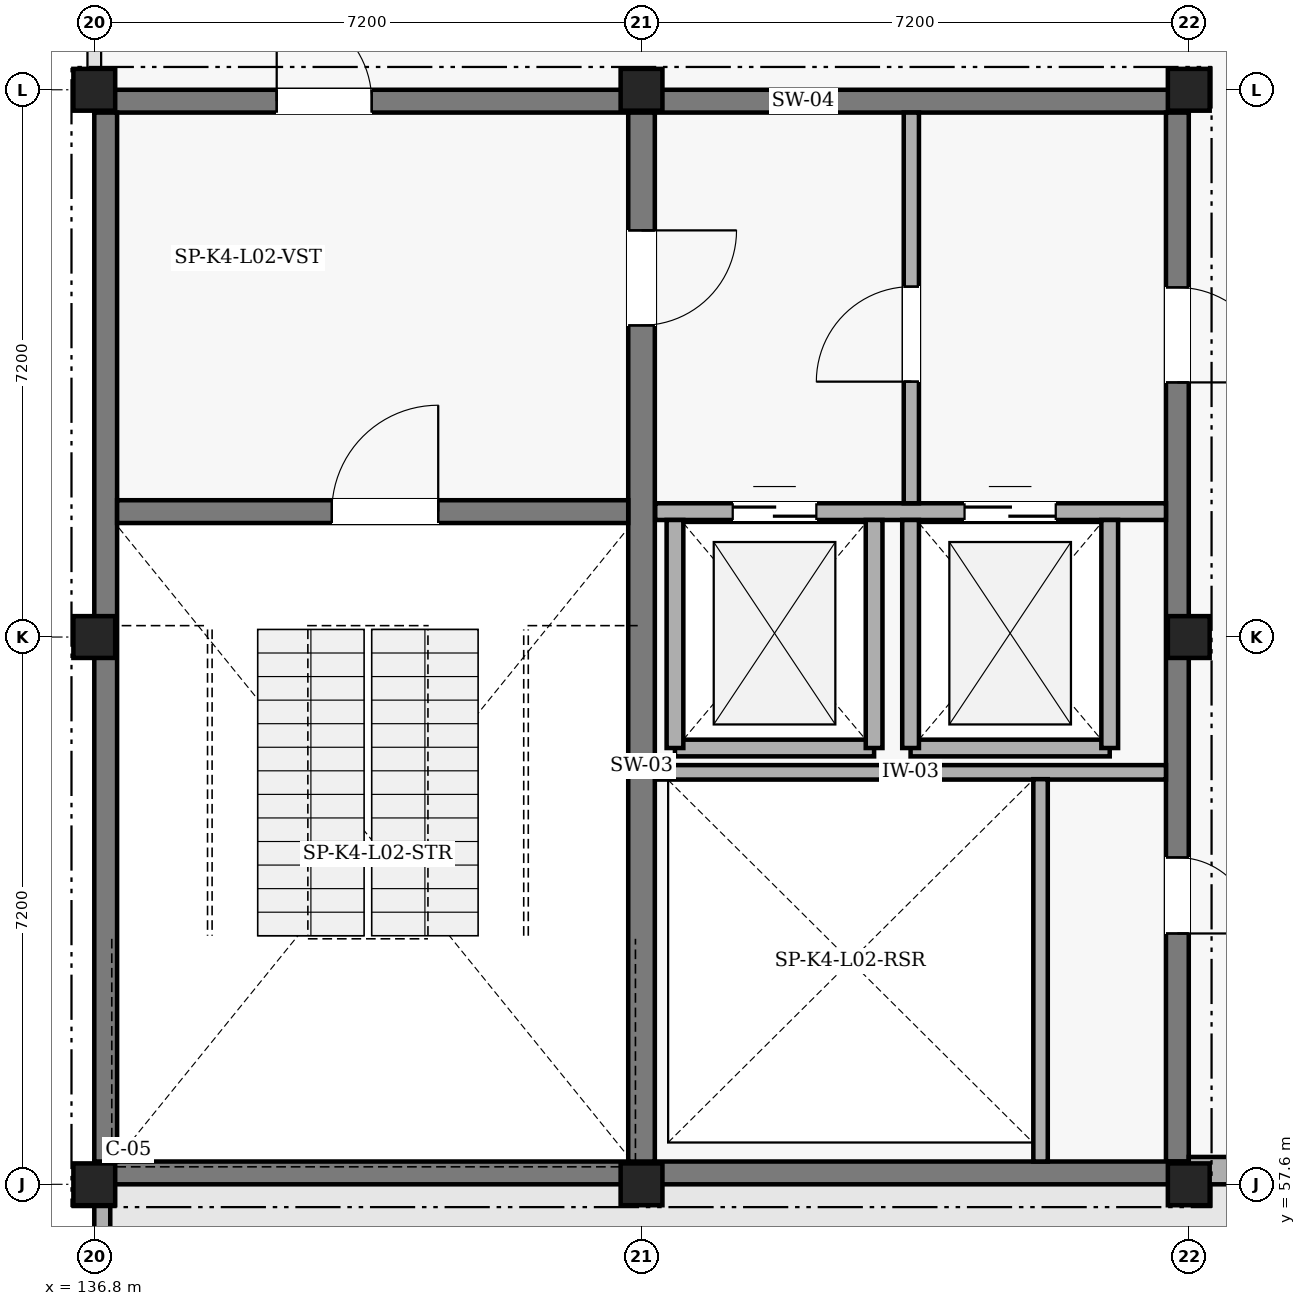
"""IFC4 building model, lengths in metres.
Left out: names, types, materials, properties, quantities, classifications, styles, units other than length and angle.
Written with IfcOpenShell. Run it as: python <this file> out.ifc"""

import sys

from ifc_helpers import new_model, si_unit, direction, frame, frame_2d, origin, origin_2d, place, context, subcontext, project, spatial, rectangle, extrude, element, fill, save


model = new_model("IFC4")
c1 = context("Model", 3, precision=1e-05, world=origin(), true_north=direction((0.0, 1.0)))
c2 = subcontext(c1, "Body", "Model", "MODEL_VIEW")
j1 = project(units=[si_unit("LENGTHUNIT", "METRE"), si_unit("PLANEANGLEUNIT", "RADIAN")], contexts=[c1])
p1 = place(None, origin())
s1 = spatial("IfcSite", under=j1, at=p1, CompositionType="ELEMENT")
p2 = place(p1, origin())
s2 = spatial("IfcBuilding", under=s1, at=p2, CompositionType="ELEMENT")
p3 = place(p2, frame((0.0, 0.0, 9.6)))
s3 = spatial("IfcBuildingStorey", under=s2, at=p3, CompositionType="ELEMENT", Elevation=9.6)
p4 = place(p3, frame((136.8, 71.85, 0.0), z_axis=(0.0, 0.0, 1.0), x_axis=(1.0, 0.0, 0.0)))
e1 = element("IfcWall", 1, at=p4, inside=s3, PredefinedType="SHEAR", context=c2, shape_type="SweptSolid", body=[
    extrude(rectangle(XDim=14.4, YDim=0.3, at=frame_2d((7.2, 0.0))), origin(), (0.0, 0.0, 1.0), 4.2),
])
p5 = place(p4, frame((2.4, 0.0, 0.0)))
e2 = element("IfcOpeningElement", 2, at=p5, cuts=e1, PredefinedType="OPENING", context=c2, shape_type="SweptSolid", body=[
    extrude(rectangle(XDim=1.25, YDim=2.2, at=frame_2d((0.625, 1.1))), frame((0.0, 0.16, 0.0), z_axis=(0.0, -1.0, 0.0), x_axis=(1.0, 0.0, 0.0)), (0.0, 0.0, 1.0), 0.32),
])
p6 = place(p3, frame((151.05, 71.7, 0.0), z_axis=(0.0, 0.0, 1.0), x_axis=(0.0, -1.0, 0.0)))
e3 = element("IfcWall", 3, at=p6, inside=s3, PredefinedType="SHEAR", context=c2, shape_type="SweptSolid", body=[
    extrude(rectangle(XDim=13.8, YDim=0.3, at=frame_2d((6.9, 0.0))), origin(), (0.0, 0.0, 1.0), 4.2),
])
p7 = place(p6, frame((9.8, 0.0, 0.0)))
e4 = element("IfcOpeningElement", 4, at=p7, cuts=e3, PredefinedType="OPENING", context=c2, shape_type="SweptSolid", body=[
    extrude(rectangle(XDim=1.0, YDim=2.15, at=frame_2d((0.5, 1.075))), frame((0.0, 0.16, 0.0), z_axis=(0.0, -1.0, 0.0), x_axis=(1.0, 0.0, 0.0)), (0.0, 0.0, 1.0), 0.32),
])
p8 = place(p6, frame((2.3, 0.0, 0.0)))
e5 = element("IfcOpeningElement", 5, at=p8, cuts=e3, PredefinedType="OPENING", context=c2, shape_type="SweptSolid", body=[
    extrude(rectangle(XDim=1.25, YDim=2.2, at=frame_2d((0.625, 1.1))), frame((0.0, 0.16, 0.0), z_axis=(0.0, -1.0, 0.0), x_axis=(1.0, 0.0, 0.0)), (0.0, 0.0, 1.0), 0.32),
])
p9 = place(p3, frame((151.2, 57.75, 0.0), z_axis=(0.0, 0.0, 1.0), x_axis=(-1.0, 0.0, 0.0)))
e6 = element("IfcWall", 6, at=p9, inside=s3, PredefinedType="SHEAR", context=c2, shape_type="SweptSolid", body=[
    extrude(rectangle(XDim=14.4, YDim=0.3, at=frame_2d((7.2, 0.0))), origin(), (0.0, 0.0, 1.0), 4.2),
])
p10 = place(p3, frame((136.95, 57.9, 0.0), z_axis=(0.0, 0.0, 1.0), x_axis=(0.0, 1.0, 0.0)))
e7 = element("IfcWall", 7, at=p10, inside=s3, PredefinedType="SHEAR", context=c2, shape_type="SweptSolid", body=[
    extrude(rectangle(XDim=13.8, YDim=0.3, at=frame_2d((6.9, 0.0))), origin(), (0.0, 0.0, 1.0), 4.2),
])
p11 = place(p3, frame((144.0, 71.7, 0.0), z_axis=(0.0, 0.0, 1.0), x_axis=(0.0, -1.0, 0.0)))
e8 = element("IfcWall", 8, at=p11, inside=s3, PredefinedType="SHEAR", context=c2, shape_type="SweptSolid", body=[
    extrude(rectangle(XDim=13.8, YDim=0.35, at=frame_2d((6.9, 0.0))), origin(), (0.0, 0.0, 1.0), 4.2),
])
p12 = place(p11, frame((1.55, 0.0, 0.0)))
e9 = element("IfcOpeningElement", 9, at=p12, cuts=e8, PredefinedType="OPENING", context=c2, shape_type="SweptSolid", body=[
    extrude(rectangle(XDim=1.25, YDim=2.2, at=frame_2d((0.625, 1.1))), frame((0.0, 0.185, 0.0), z_axis=(0.0, -1.0, 0.0), x_axis=(1.0, 0.0, 0.0)), (0.0, 0.0, 1.0), 0.37),
])
p13 = place(p3, frame((137.1, 66.45, 0.0), z_axis=(0.0, 0.0, 1.0), x_axis=(1.0, 0.0, 0.0)))
e10 = element("IfcWall", 10, at=p13, inside=s3, PredefinedType="SHEAR", context=c2, shape_type="SweptSolid", body=[
    extrude(rectangle(XDim=6.725, YDim=0.3, at=frame_2d((3.362, 0.0))), origin(), (0.0, 0.0, 1.0), 4.2),
])
p14 = place(p13, frame((2.825, 0.0, 0.0)))
e11 = element("IfcOpeningElement", 11, at=p14, cuts=e10, PredefinedType="OPENING", context=c2, shape_type="SweptSolid", body=[
    extrude(rectangle(XDim=1.4, YDim=2.2, at=frame_2d((0.7, 1.1))), frame((0.0, 0.16, 0.0), z_axis=(0.0, -1.0, 0.0), x_axis=(1.0, 0.0, 0.0)), (0.0, 0.0, 1.0), 0.32),
])
for number, where, z_axis, x_axis in (
    (12, (136.8, 57.6, 0.0), (0.0, 0.0, 1.0), (1.0, 0.0, 0.0)),
    (13, (136.8, 64.8, 0.0), (0.0, 0.0, 1.0), (1.0, 0.0, 0.0)),
    (14, (136.8, 72.0, 0.0), (0.0, 0.0, 1.0), (1.0, 0.0, 0.0)),
    (15, (144.0, 57.6, 0.0), (0.0, 0.0, 1.0), (1.0, 0.0, 0.0)),
    (16, (144.0, 72.0, 0.0), (0.0, 0.0, 1.0), (1.0, 0.0, 0.0)),
    (17, (151.2, 57.6, 0.0), (0.0, 0.0, 1.0), (1.0, 0.0, 0.0)),
    (18, (151.2, 64.8, 0.0), (0.0, 0.0, 1.0), (1.0, 0.0, 0.0)),
    (19, (151.2, 72.0, 0.0), (0.0, 0.0, 1.0), (1.0, 0.0, 0.0)),
):
    element("IfcColumn", number, at=place(p3, frame(where, z_axis=z_axis, x_axis=x_axis)), inside=s3, PredefinedType="COLUMN", context=c2, shape_type="SweptSolid", body=[
        extrude(rectangle(XDim=0.55, YDim=0.55, at=origin_2d()), origin(), (0.0, 0.0, 1.0), 3.92),
    ])
p15 = place(p3, frame((158.4, 57.78, 0.0), z_axis=(0.0, 0.0, 1.0), x_axis=(-1.0, 0.0, 0.0)))
e20 = element("IfcWall", 20, at=p15, inside=s3, PredefinedType="SOLIDWALL", context=c2, shape_type="SweptSolid", body=[
    extrude(rectangle(XDim=7.2, YDim=0.36, at=frame_2d((3.6, 0.0))), origin(), (0.0, 0.0, 1.0), 3.62),
])
p16 = place(p3, frame((136.905, 57.6, 0.0), z_axis=(0.0, 0.0, 1.0), x_axis=(0.0, -1.0, 0.0)))
e21 = element("IfcWall", 21, at=p16, inside=s3, PredefinedType="PARAPET", context=c2, shape_type="SweptSolid", body=[
    extrude(rectangle(XDim=14.4, YDim=0.21, at=frame_2d((7.2, 0.0))), origin(), (0.0, 0.0, 1.0), 0.55),
])
p17 = place(p3, frame((144.18, 63.02, 0.0), z_axis=(0.0, 0.0, 1.0), x_axis=(1.0, 0.0, 0.0)))
e22 = element("IfcWall", 22, at=p17, inside=s3, PredefinedType="PARTITIONING", context=c2, shape_type="SweptSolid", body=[
    extrude(rectangle(XDim=6.72, YDim=0.19, at=frame_2d((3.36, 0.0))), origin(), (0.0, 0.0, 1.0), 3.85),
])
p18 = place(p3, frame((149.25, 57.9, 0.0), z_axis=(0.0, 0.0, 1.0), x_axis=(0.0, 1.0, 0.0)))
e23 = element("IfcWall", 23, at=p18, inside=s3, PredefinedType="PARTITIONING", context=c2, shape_type="SweptSolid", body=[
    extrude(rectangle(XDim=5.03, YDim=0.19, at=frame_2d((2.515, 0.0))), origin(), (0.0, 0.0, 1.0), 3.85),
])
p19 = place(p3, frame((144.18, 66.45, 0.0), z_axis=(0.0, 0.0, 1.0), x_axis=(1.0, 0.0, 0.0)))
e24 = element("IfcWall", 24, at=p19, inside=s3, PredefinedType="PARTITIONING", context=c2, shape_type="SweptSolid", body=[
    extrude(rectangle(XDim=6.72, YDim=0.22, at=frame_2d((3.36, 0.0))), origin(), (0.0, 0.0, 1.0), 3.85),
])
p20 = place(p19, frame((1.02, 0.0, 0.0)))
e25 = element("IfcOpeningElement", 25, at=p20, cuts=e24, PredefinedType="OPENING", context=c2, shape_type="SweptSolid", body=[
    extrude(rectangle(XDim=1.1, YDim=2.15, at=frame_2d((0.55, 1.075))), frame((0.0, 0.12, 0.0), z_axis=(0.0, -1.0, 0.0), x_axis=(1.0, 0.0, 0.0)), (0.0, 0.0, 1.0), 0.24),
])
p21 = place(p19, frame((4.07, 0.0, 0.0)))
e26 = element("IfcOpeningElement", 26, at=p21, cuts=e24, PredefinedType="OPENING", context=c2, shape_type="SweptSolid", body=[
    extrude(rectangle(XDim=1.2, YDim=2.15, at=frame_2d((0.6, 1.075))), frame((0.0, 0.12, 0.0), z_axis=(0.0, -1.0, 0.0), x_axis=(1.0, 0.0, 0.0)), (0.0, 0.0, 1.0), 0.24),
])
p22 = place(p3, frame((144.44, 63.34, 0.0), z_axis=(0.0, 0.0, 1.0), x_axis=(1.0, 0.0, 0.0)))
e27 = element("IfcWall", 27, at=p22, inside=s3, PredefinedType="PARTITIONING", context=c2, shape_type="SweptSolid", body=[
    extrude(rectangle(XDim=2.62, YDim=0.22, at=frame_2d((1.31, 0.0))), origin(), (0.0, 0.0, 1.0), 3.85),
])
for number, where, z_axis, x_axis in (
    (28, (144.44, 63.34, 0.0), (0.0, 0.0, 1.0), (0.0, 1.0, 0.0)),
    (29, (147.06, 63.34, 0.0), (0.0, 0.0, 1.0), (0.0, 1.0, 0.0)),
):
    element("IfcWall", number, at=place(p3, frame(where, z_axis=z_axis, x_axis=x_axis)), inside=s3, PredefinedType="PARTITIONING", context=c2, shape_type="SweptSolid", body=[
        extrude(rectangle(XDim=3.0, YDim=0.22, at=frame_2d((1.5, 0.0))), origin(), (0.0, 0.0, 1.0), 3.85),
    ])
p23 = place(p3, frame((147.54, 63.34, 0.0), z_axis=(0.0, 0.0, 1.0), x_axis=(1.0, 0.0, 0.0)))
e30 = element("IfcWall", 30, at=p23, inside=s3, PredefinedType="PARTITIONING", context=c2, shape_type="SweptSolid", body=[
    extrude(rectangle(XDim=2.62, YDim=0.22, at=frame_2d((1.31, 0.0))), origin(), (0.0, 0.0, 1.0), 3.85),
])
for number, where, z_axis, x_axis in (
    (31, (147.54, 63.34, 0.0), (0.0, 0.0, 1.0), (0.0, 1.0, 0.0)),
    (32, (150.16, 63.34, 0.0), (0.0, 0.0, 1.0), (0.0, 1.0, 0.0)),
):
    element("IfcWall", number, at=place(p3, frame(where, z_axis=z_axis, x_axis=x_axis)), inside=s3, PredefinedType="PARTITIONING", context=c2, shape_type="SweptSolid", body=[
        extrude(rectangle(XDim=3.0, YDim=0.22, at=frame_2d((1.5, 0.0))), origin(), (0.0, 0.0, 1.0), 3.85),
    ])
p24 = place(p3, frame((147.55, 66.56, 0.0), z_axis=(0.0, 0.0, 1.0), x_axis=(0.0, 1.0, 0.0)))
e33 = element("IfcWall", 33, at=p24, inside=s3, PredefinedType="PARTITIONING", context=c2, shape_type="SweptSolid", body=[
    extrude(rectangle(XDim=5.14, YDim=0.2, at=frame_2d((2.57, 0.0))), origin(), (0.0, 0.0, 1.0), 3.85),
])
p25 = place(p24, frame((1.6, 0.0, 0.0)))
e34 = element("IfcOpeningElement", 34, at=p25, cuts=e33, PredefinedType="OPENING", context=c2, shape_type="SweptSolid", body=[
    extrude(rectangle(XDim=1.25, YDim=2.2, at=frame_2d((0.625, 1.1))), frame((0.0, 0.11, 0.0), z_axis=(0.0, -1.0, 0.0), x_axis=(1.0, 0.0, 0.0)), (0.0, 0.0, 1.0), 0.22),
])
p26 = place(p14, origin())
e35 = element("IfcDoor", 35, at=p26, inside=s3, OperationType="SINGLE_SWING_RIGHT", PredefinedType="DOOR", context=c2, shape_type="SweptSolid", body=[
    extrude(rectangle(XDim=1.4, YDim=2.2, at=frame_2d((0.7, 1.1))), frame((0.0, 0.025, 0.0), z_axis=(0.0, -1.0, 0.0), x_axis=(1.0, 0.0, 0.0)), (0.0, 0.0, 1.0), 0.05),
])
fill(e11, e35)
p27 = place(p12, origin())
e36 = element("IfcDoor", 36, at=p27, inside=s3, OperationType="SINGLE_SWING_LEFT", PredefinedType="DOOR", context=c2, shape_type="SweptSolid", body=[
    extrude(rectangle(XDim=1.25, YDim=2.2, at=frame_2d((0.625, 1.1))), frame((0.0, 0.025, 0.0), z_axis=(0.0, -1.0, 0.0), x_axis=(1.0, 0.0, 0.0)), (0.0, 0.0, 1.0), 0.05),
])
fill(e9, e36)
p28 = place(p7, origin())
e37 = element("IfcDoor", 37, at=p28, inside=s3, OperationType="SINGLE_SWING_RIGHT", PredefinedType="DOOR", context=c2, shape_type="SweptSolid", body=[
    extrude(rectangle(XDim=1.0, YDim=2.15, at=frame_2d((0.5, 1.075))), frame((0.0, 0.025, 0.0), z_axis=(0.0, -1.0, 0.0), x_axis=(1.0, 0.0, 0.0)), (0.0, 0.0, 1.0), 0.05),
])
fill(e4, e37)
p29 = place(p20, origin())
e38 = element("IfcDoor", 38, at=p29, inside=s3, OperationType="DOUBLE_DOOR_SLIDING", PredefinedType="DOOR", context=c2, shape_type="SweptSolid", body=[
    extrude(rectangle(XDim=1.1, YDim=2.15, at=frame_2d((0.55, 1.075))), frame((0.0, 0.025, 0.0), z_axis=(0.0, -1.0, 0.0), x_axis=(1.0, 0.0, 0.0)), (0.0, 0.0, 1.0), 0.05),
])
fill(e25, e38)
p30 = place(p21, origin())
e39 = element("IfcDoor", 39, at=p30, inside=s3, OperationType="DOUBLE_DOOR_SLIDING", PredefinedType="DOOR", context=c2, shape_type="SweptSolid", body=[
    extrude(rectangle(XDim=1.2, YDim=2.15, at=frame_2d((0.6, 1.075))), frame((0.0, 0.025, 0.0), z_axis=(0.0, -1.0, 0.0), x_axis=(1.0, 0.0, 0.0)), (0.0, 0.0, 1.0), 0.05),
])
fill(e26, e39)
p31 = place(p25, origin())
e40 = element("IfcDoor", 40, at=p31, inside=s3, OperationType="SINGLE_SWING_LEFT", PredefinedType="DOOR", context=c2, shape_type="SweptSolid", body=[
    extrude(rectangle(XDim=1.25, YDim=2.2, at=frame_2d((0.625, 1.1))), frame((0.0, 0.025, 0.0), z_axis=(0.0, -1.0, 0.0), x_axis=(1.0, 0.0, 0.0)), (0.0, 0.0, 1.0), 0.05),
])
fill(e34, e40)
p32 = place(p8, origin())
e41 = element("IfcDoor", 41, at=p32, inside=s3, OperationType="SINGLE_SWING_RIGHT", PredefinedType="DOOR", context=c2, shape_type="SweptSolid", body=[
    extrude(rectangle(XDim=1.25, YDim=2.2, at=frame_2d((0.625, 1.1))), frame((0.0, 0.025, 0.0), z_axis=(0.0, -1.0, 0.0), x_axis=(1.0, 0.0, 0.0)), (0.0, 0.0, 1.0), 0.05),
])
fill(e5, e41)
p33 = place(p5, origin())
e42 = element("IfcDoor", 42, at=p33, inside=s3, OperationType="SINGLE_SWING_LEFT", PredefinedType="DOOR", context=c2, shape_type="SweptSolid", body=[
    extrude(rectangle(XDim=1.25, YDim=2.2, at=frame_2d((0.625, 1.1))), frame((0.0, 0.025, 0.0), z_axis=(0.0, -1.0, 0.0), x_axis=(1.0, 0.0, 0.0)), (0.0, 0.0, 1.0), 0.05),
])
fill(e2, e42)
save(model, sys.argv[1])
